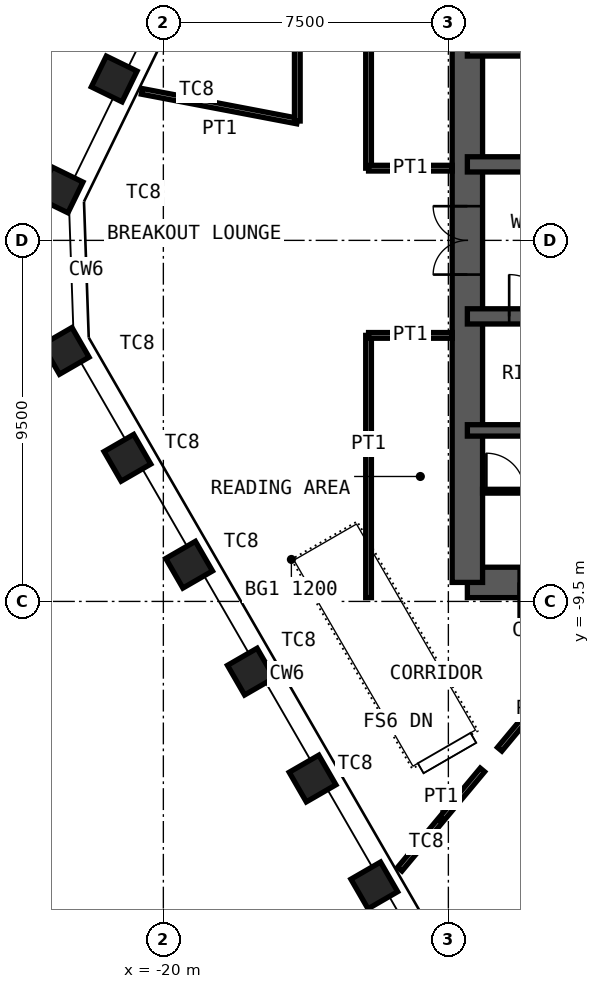
"""IFC4 building model, lengths in metres.
Left out: names, types, materials, properties, quantities, classifications, styles, units other than length and angle.
Written with IfcOpenShell. Run it as: python <this file> out.ifc"""

import sys

from ifc_helpers import new_model, si_unit, direction, frame, frame_2d, origin, origin_2d, place, context, subcontext, project, spatial, rectangle, hollow_rectangle, extrude, element, fill, save


model = new_model("IFC4")
c1 = context("Model", 3, precision=1e-05, world=origin(), true_north=direction((0.0, 1.0)))
c2 = subcontext(c1, "Body", "Model", "MODEL_VIEW")
j1 = project(units=[si_unit("LENGTHUNIT", "METRE"), si_unit("PLANEANGLEUNIT", "RADIAN")], contexts=[c1])
p1 = place(None, origin())
s1 = spatial("IfcSite", under=j1, at=p1, CompositionType="ELEMENT")
p2 = place(p1, origin())
s2 = spatial("IfcBuilding", under=s1, at=p2, CompositionType="ELEMENT")
p3 = place(p2, frame((0.0, 0.0, 333.4)))
s3 = spatial("IfcBuildingStorey", under=s2, at=p3, CompositionType="ELEMENT", Elevation=333.4)
for number, where, z_axis, x_axis in (
    (1, (-14.449, -16.973, 0.0), (0.0, 0.0, 1.0), (0.5, -0.866, 0.0)),
    (2, (-16.073, -14.16, 0.0), (0.0, 0.0, 1.0), (0.5, -0.866, 0.0)),
    (3, (-17.698, -11.347, 0.0), (0.0, 0.0, 1.0), (0.5, -0.866, 0.0)),
    (4, (-19.322, -8.534, 0.0), (0.0, 0.0, 1.0), (0.5, -0.866, 0.0)),
    (5, (-20.946, -5.721, 0.0), (0.0, 0.0, 1.0), (0.5, -0.866, 0.0)),
    (6, (-22.57, -2.908, 0.0), (0.0, 0.0, 1.0), (0.5, -0.866, 0.0)),
    (7, (-22.717, 1.327, 0.0), (0.0, 0.0, 1.0), (-0.438, -0.899, 0.0)),
    (8, (-21.293, 4.246, 0.0), (0.0, 0.0, 1.0), (-0.438, -0.899, 0.0)),
):
    element("IfcColumn", number, at=place(p3, frame(where, z_axis=z_axis, x_axis=x_axis)), inside=s3, PredefinedType="COLUMN", context=c2, shape_type="SweptSolid", body=[
        extrude(hollow_rectangle(XDim=0.9, YDim=0.9, WallThickness=0.05, at=origin_2d()), origin(), (0.0, 0.0, 1.0), 4.2),
    ])
p4 = place(p3, frame((-12.0, -9.0, 0.0), z_axis=(0.0, 0.0, 1.0), x_axis=(1.0, 0.0, 0.0)))
e9 = element("IfcWall", 9, at=p4, inside=s3, PredefinedType="SHEAR", context=c2, shape_type="SweptSolid", body=[
    extrude(rectangle(XDim=24.0, YDim=0.8, at=frame_2d((12.0, 0.0))), origin(), (0.0, 0.0, 1.0), 4.2),
])
p5 = place(p4, frame((1.35, 0.0, 0.0)))
e10 = element("IfcOpeningElement", 10, at=p5, cuts=e9, PredefinedType="OPENING", context=c2, shape_type="SweptSolid", body=[
    extrude(rectangle(XDim=1.0, YDim=2.1, at=frame_2d((0.5, 1.05))), frame((0.0, 0.41, 0.0), z_axis=(0.0, -1.0, 0.0), x_axis=(1.0, 0.0, 0.0)), (0.0, 0.0, 1.0), 0.82),
])
p6 = place(p4, frame((5.325, 0.0, 0.0)))
e11 = element("IfcOpeningElement", 11, at=p6, cuts=e9, PredefinedType="OPENING", context=c2, shape_type="SweptSolid", body=[
    extrude(rectangle(XDim=1.15, YDim=2.1, at=frame_2d((0.575, 1.05))), frame((0.0, 0.41, 0.0), z_axis=(0.0, -1.0, 0.0), x_axis=(1.0, 0.0, 0.0)), (0.0, 0.0, 1.0), 0.82),
])
p7 = place(p4, frame((12.6, 0.0, 0.0)))
e12 = element("IfcOpeningElement", 12, at=p7, cuts=e9, PredefinedType="OPENING", context=c2, shape_type="SweptSolid", body=[
    extrude(rectangle(XDim=1.0, YDim=2.1, at=frame_2d((0.5, 1.05))), frame((0.0, 0.41, 0.0), z_axis=(0.0, -1.0, 0.0), x_axis=(1.0, 0.0, 0.0)), (0.0, 0.0, 1.0), 0.82),
])
p8 = place(p3, frame((-12.0, -9.0, 0.0), z_axis=(0.0, 0.0, 1.0), x_axis=(0.0, 1.0, 0.0)))
e13 = element("IfcWall", 13, at=p8, inside=s3, PredefinedType="SHEAR", context=c2, shape_type="SweptSolid", body=[
    extrude(rectangle(XDim=18.0, YDim=0.8, at=frame_2d((9.0, 0.0))), origin(), (0.0, 0.0, 1.0), 4.2),
])
p9 = place(p8, frame((8.1, 0.0, 0.0)))
e14 = element("IfcOpeningElement", 14, at=p9, cuts=e13, PredefinedType="OPENING", context=c2, shape_type="SweptSolid", body=[
    extrude(rectangle(XDim=1.8, YDim=2.1, at=frame_2d((0.9, 1.05))), frame((0.0, 0.41, 0.0), z_axis=(0.0, -1.0, 0.0), x_axis=(1.0, 0.0, 0.0)), (0.0, 0.0, 1.0), 0.82),
])
p10 = place(p3, frame((-12.0, 5.0, 0.0), z_axis=(0.0, 0.0, 1.0), x_axis=(1.0, 0.0, 0.0)))
e15 = element("IfcWall", 15, at=p10, inside=s3, PredefinedType="SHEAR", context=c2, shape_type="SweptSolid", body=[
    extrude(rectangle(XDim=24.0, YDim=0.3, at=frame_2d((12.0, 0.0))), origin(), (0.0, 0.0, 1.0), 4.2),
])
p11 = place(p3, frame((-12.0, 2.0, 0.0), z_axis=(0.0, 0.0, 1.0), x_axis=(1.0, 0.0, 0.0)))
e16 = element("IfcWall", 16, at=p11, inside=s3, PredefinedType="SHEAR", context=c2, shape_type="SweptSolid", body=[
    extrude(rectangle(XDim=24.0, YDim=0.4, at=frame_2d((12.0, 0.0))), origin(), (0.0, 0.0, 1.0), 4.2),
])
p12 = place(p11, frame((2.4, 0.0, 0.0)))
e17 = element("IfcOpeningElement", 17, at=p12, cuts=e16, PredefinedType="OPENING", context=c2, shape_type="SweptSolid", body=[
    extrude(rectangle(XDim=1.1, YDim=2.1, at=frame_2d((0.55, 1.05))), frame((0.0, 0.21, 0.0), z_axis=(0.0, -1.0, 0.0), x_axis=(1.0, 0.0, 0.0)), (0.0, 0.0, 1.0), 0.42),
])
p13 = place(p11, frame((22.0, 0.0, 0.0)))
e18 = element("IfcOpeningElement", 18, at=p13, cuts=e16, PredefinedType="OPENING", context=c2, shape_type="SweptSolid", body=[
    extrude(rectangle(XDim=1.1, YDim=2.1, at=frame_2d((0.55, 1.05))), frame((0.0, 0.21, 0.0), z_axis=(0.0, -1.0, 0.0), x_axis=(1.0, 0.0, 0.0)), (0.0, 0.0, 1.0), 0.42),
])
p14 = place(p11, frame((10.15, 0.0, 0.0)))
e19 = element("IfcOpeningElement", 19, at=p14, cuts=e16, PredefinedType="OPENING", context=c2, shape_type="SweptSolid", body=[
    extrude(rectangle(XDim=1.0, YDim=2.1, at=frame_2d((0.5, 1.05))), frame((0.0, 0.21, 0.0), z_axis=(0.0, -1.0, 0.0), x_axis=(1.0, 0.0, 0.0)), (0.0, 0.0, 1.0), 0.42),
])
p15 = place(p11, frame((6.9, 0.0, 0.0)))
e20 = element("IfcOpeningElement", 20, at=p15, cuts=e16, PredefinedType="OPENING", context=c2, shape_type="SweptSolid", body=[
    extrude(rectangle(XDim=1.0, YDim=2.1, at=frame_2d((0.5, 1.05))), frame((0.0, 0.21, 0.0), z_axis=(0.0, -1.0, 0.0), x_axis=(1.0, 0.0, 0.0)), (0.0, 0.0, 1.0), 0.42),
])
p16 = place(p11, frame((13.35, 0.0, 0.0)))
e21 = element("IfcOpeningElement", 21, at=p16, cuts=e16, PredefinedType="OPENING", context=c2, shape_type="SweptSolid", body=[
    extrude(rectangle(XDim=1.1, YDim=2.4, at=frame_2d((0.55, 1.2))), frame((0.0, 0.21, 0.0), z_axis=(0.0, -1.0, 0.0), x_axis=(1.0, 0.0, 0.0)), (0.0, 0.0, 1.0), 0.42),
])
p17 = place(p11, frame((16.15, 0.0, 0.0)))
e22 = element("IfcOpeningElement", 22, at=p17, cuts=e16, PredefinedType="OPENING", context=c2, shape_type="SweptSolid", body=[
    extrude(rectangle(XDim=1.1, YDim=2.4, at=frame_2d((0.55, 1.2))), frame((0.0, 0.21, 0.0), z_axis=(0.0, -1.0, 0.0), x_axis=(1.0, 0.0, 0.0)), (0.0, 0.0, 1.0), 0.42),
])
p18 = place(p11, frame((19.0, 0.0, 0.0)))
e23 = element("IfcOpeningElement", 23, at=p18, cuts=e16, PredefinedType="OPENING", context=c2, shape_type="SweptSolid", body=[
    extrude(rectangle(XDim=1.0, YDim=2.1, at=frame_2d((0.5, 1.05))), frame((0.0, 0.21, 0.0), z_axis=(0.0, -1.0, 0.0), x_axis=(1.0, 0.0, 0.0)), (0.0, 0.0, 1.0), 0.42),
])
p19 = place(p3, frame((-12.0, -2.0, 0.0), z_axis=(0.0, 0.0, 1.0), x_axis=(1.0, 0.0, 0.0)))
e24 = element("IfcWall", 24, at=p19, inside=s3, PredefinedType="SHEAR", context=c2, shape_type="SweptSolid", body=[
    extrude(rectangle(XDim=24.0, YDim=0.4, at=frame_2d((12.0, 0.0))), origin(), (0.0, 0.0, 1.0), 4.2),
])
p20 = place(p19, frame((1.1, 0.0, 0.0)))
e25 = element("IfcOpeningElement", 25, at=p20, cuts=e24, PredefinedType="OPENING", context=c2, shape_type="SweptSolid", body=[
    extrude(rectangle(XDim=1.1, YDim=2.1, at=frame_2d((0.55, 1.05))), frame((0.0, 0.21, 0.0), z_axis=(0.0, -1.0, 0.0), x_axis=(1.0, 0.0, 0.0)), (0.0, 0.0, 1.0), 0.42),
])
p21 = place(p19, frame((13.55, 0.0, 0.0)))
e26 = element("IfcOpeningElement", 26, at=p21, cuts=e24, PredefinedType="OPENING", context=c2, shape_type="SweptSolid", body=[
    extrude(rectangle(XDim=1.1, YDim=2.1, at=frame_2d((0.55, 1.05))), frame((0.0, 0.21, 0.0), z_axis=(0.0, -1.0, 0.0), x_axis=(1.0, 0.0, 0.0)), (0.0, 0.0, 1.0), 0.42),
])
p22 = place(p19, frame((20.7, 0.0, 0.0)))
e27 = element("IfcOpeningElement", 27, at=p22, cuts=e24, PredefinedType="OPENING", context=c2, shape_type="SweptSolid", body=[
    extrude(rectangle(XDim=1.1, YDim=2.1, at=frame_2d((0.55, 1.05))), frame((0.0, 0.21, 0.0), z_axis=(0.0, -1.0, 0.0), x_axis=(1.0, 0.0, 0.0)), (0.0, 0.0, 1.0), 0.42),
])
p23 = place(p19, frame((4.0, 0.0, 0.0)))
e28 = element("IfcOpeningElement", 28, at=p23, cuts=e24, PredefinedType="OPENING", context=c2, shape_type="SweptSolid", body=[
    extrude(rectangle(XDim=1.0, YDim=2.1, at=frame_2d((0.5, 1.05))), frame((0.0, 0.21, 0.0), z_axis=(0.0, -1.0, 0.0), x_axis=(1.0, 0.0, 0.0)), (0.0, 0.0, 1.0), 0.42),
])
p24 = place(p19, frame((6.8, 0.0, 0.0)))
e29 = element("IfcOpeningElement", 29, at=p24, cuts=e24, PredefinedType="OPENING", context=c2, shape_type="SweptSolid", body=[
    extrude(rectangle(XDim=1.0, YDim=2.1, at=frame_2d((0.5, 1.05))), frame((0.0, 0.21, 0.0), z_axis=(0.0, -1.0, 0.0), x_axis=(1.0, 0.0, 0.0)), (0.0, 0.0, 1.0), 0.42),
])
p25 = place(p19, frame((9.6, 0.0, 0.0)))
e30 = element("IfcOpeningElement", 30, at=p25, cuts=e24, PredefinedType="OPENING", context=c2, shape_type="SweptSolid", body=[
    extrude(rectangle(XDim=1.0, YDim=2.1, at=frame_2d((0.5, 1.05))), frame((0.0, 0.21, 0.0), z_axis=(0.0, -1.0, 0.0), x_axis=(1.0, 0.0, 0.0)), (0.0, 0.0, 1.0), 0.42),
])
p26 = place(p3, frame((-12.0, -5.0, 0.0), z_axis=(0.0, 0.0, 1.0), x_axis=(1.0, 0.0, 0.0)))
e31 = element("IfcWall", 31, at=p26, inside=s3, PredefinedType="SHEAR", context=c2, shape_type="SweptSolid", body=[
    extrude(rectangle(XDim=24.0, YDim=0.3, at=frame_2d((12.0, 0.0))), origin(), (0.0, 0.0, 1.0), 4.2),
])
p27 = place(p3, frame((-11.6, -6.6, 0.0), z_axis=(0.0, 0.0, 1.0), x_axis=(1.0, 0.0, 0.0)))
e32 = element("IfcWall", 32, at=p27, inside=s3, PredefinedType="PARTITIONING", context=c2, shape_type="SweptSolid", body=[
    extrude(rectangle(XDim=3.25, YDim=0.1, at=frame_2d((1.625, 0.0))), origin(), (0.0, 0.0, 1.0), 3.98),
])
p28 = place(p27, frame((0.1, 0.0, 0.0)))
e33 = element("IfcOpeningElement", 33, at=p28, cuts=e32, PredefinedType="OPENING", context=c2, shape_type="SweptSolid", body=[
    extrude(rectangle(XDim=1.0, YDim=2.4, at=frame_2d((0.5, 1.2))), frame((0.0, 0.06, 0.0), z_axis=(0.0, -1.0, 0.0), x_axis=(1.0, 0.0, 0.0)), (0.0, 0.0, 1.0), 0.12),
])
p29 = place(p3, frame((-20.566, 3.921, 0.0), z_axis=(0.0, 0.0, 1.0), x_axis=(0.982304172816, -0.187292584123, 0.0)))
e34 = element("IfcWall", 34, at=p29, inside=s3, PredefinedType="PARTITIONING", context=c2, shape_type="SweptSolid", body=[
    extrude(rectangle(XDim=4.165, YDim=0.15, at=frame_2d((2.083, 0.0))), origin(), (0.0, 0.0, 1.0), 3.02),
])
p30 = place(p3, frame((-16.475, 3.141, 0.0), z_axis=(0.0, 0.0, 1.0), x_axis=(0.0, 1.0, 0.0)))
e35 = element("IfcWall", 35, at=p30, inside=s3, PredefinedType="PARTITIONING", context=c2, shape_type="SweptSolid", body=[
    extrude(rectangle(XDim=8.134, YDim=0.15, at=frame_2d((4.067, 0.0))), origin(), (0.0, 0.0, 1.0), 3.92),
])
p31 = place(p3, frame((-13.779, -16.546, 0.0), z_axis=(0.0, 0.0, 1.0), x_axis=(0.639937109246, 0.768427287523, 0.0)))
e36 = element("IfcWall", 36, at=p31, inside=s3, PredefinedType="PARTITIONING", context=c2, shape_type="SweptSolid", body=[
    extrude(rectangle(XDim=3.399, YDim=0.15, at=frame_2d((1.7, 0.0))), origin(), (0.0, 0.0, 1.0), 2.72),
])
p32 = place(p3, frame((-11.15, -13.389, 0.0), z_axis=(0.0, 0.0, 1.0), x_axis=(0.639931226982, 0.768432186165, 0.0)))
e37 = element("IfcWall", 37, at=p32, inside=s3, PredefinedType="PARTITIONING", context=c2, shape_type="SweptSolid", body=[
    extrude(rectangle(XDim=2.751, YDim=0.15, at=frame_2d((1.375, 0.0))), origin(), (0.0, 0.0, 1.0), 2.72),
])
p33 = place(p3, frame((-14.6, 1.9, 0.0), z_axis=(0.0, 0.0, 1.0), x_axis=(0.0, 1.0, 0.0)))
e38 = element("IfcWall", 38, at=p33, inside=s3, PredefinedType="PARTITIONING", context=c2, shape_type="SweptSolid", body=[
    extrude(rectangle(XDim=7.5, YDim=0.15, at=frame_2d((3.75, 0.0))), origin(), (0.0, 0.0, 1.0), 3.92),
])
p34 = place(p3, frame((-12.4, 1.9, 0.0), z_axis=(0.0, 0.0, 1.0), x_axis=(-1.0, 0.0, 0.0)))
e39 = element("IfcWall", 39, at=p34, inside=s3, PredefinedType="PARTITIONING", context=c2, shape_type="SweptSolid", body=[
    extrude(rectangle(XDim=2.2, YDim=0.15, at=frame_2d((1.1, 0.0))), origin(), (0.0, 0.0, 1.0), 3.12),
])
p35 = place(p3, frame((-14.6, -9.4, 0.0), z_axis=(0.0, 0.0, 1.0), x_axis=(0.0, 1.0, 0.0)))
e40 = element("IfcWall", 40, at=p35, inside=s3, PredefinedType="PARTITIONING", context=c2, shape_type="SweptSolid", body=[
    extrude(rectangle(XDim=6.9, YDim=0.15, at=frame_2d((3.45, 0.0))), origin(), (0.0, 0.0, 1.0), 3.92),
])
p36 = place(p3, frame((-12.4, -2.5, 0.0), z_axis=(0.0, 0.0, 1.0), x_axis=(-1.0, 0.0, 0.0)))
e41 = element("IfcWall", 41, at=p36, inside=s3, PredefinedType="PARTITIONING", context=c2, shape_type="SweptSolid", body=[
    extrude(rectangle(XDim=2.2, YDim=0.15, at=frame_2d((1.1, 0.0))), origin(), (0.0, 0.0, 1.0), 3.12),
])
p37 = place(p5, origin())
e42 = element("IfcDoor", 42, at=p37, inside=s3, OperationType="SINGLE_SWING_LEFT", PredefinedType="DOOR", context=c2, shape_type="SweptSolid", body=[
    extrude(rectangle(XDim=1.0, YDim=2.1, at=frame_2d((0.5, 1.05))), frame((0.0, 0.025, 0.0), z_axis=(0.0, -1.0, 0.0), x_axis=(1.0, 0.0, 0.0)), (0.0, 0.0, 1.0), 0.05),
])
fill(e10, e42)
p38 = place(p20, origin())
e43 = element("IfcDoor", 43, at=p38, inside=s3, OperationType="SINGLE_SWING_RIGHT", PredefinedType="DOOR", context=c2, shape_type="SweptSolid", body=[
    extrude(rectangle(XDim=1.1, YDim=2.1, at=frame_2d((0.55, 1.05))), frame((0.0, 0.025, 0.0), z_axis=(0.0, -1.0, 0.0), x_axis=(1.0, 0.0, 0.0)), (0.0, 0.0, 1.0), 0.05),
])
fill(e25, e43)
p39 = place(p9, origin())
e44 = element("IfcDoor", 44, at=p39, inside=s3, OperationType="DOUBLE_DOOR_DOUBLE_SWING", PredefinedType="DOOR", context=c2, shape_type="SweptSolid", body=[
    extrude(rectangle(XDim=1.8, YDim=2.1, at=frame_2d((0.9, 1.05))), frame((0.0, 0.025, 0.0), z_axis=(0.0, -1.0, 0.0), x_axis=(1.0, 0.0, 0.0)), (0.0, 0.0, 1.0), 0.05),
])
fill(e14, e44)
p40 = place(p28, origin())
e45 = element("IfcDoor", 45, at=p40, inside=s3, OperationType="SINGLE_SWING_RIGHT", PredefinedType="DOOR", context=c2, shape_type="SweptSolid", body=[
    extrude(rectangle(XDim=1.0, YDim=2.4, at=frame_2d((0.5, 1.2))), frame((0.0, 0.025, 0.0), z_axis=(0.0, -1.0, 0.0), x_axis=(1.0, 0.0, 0.0)), (0.0, 0.0, 1.0), 0.05),
])
fill(e33, e45)
save(model, sys.argv[1])
